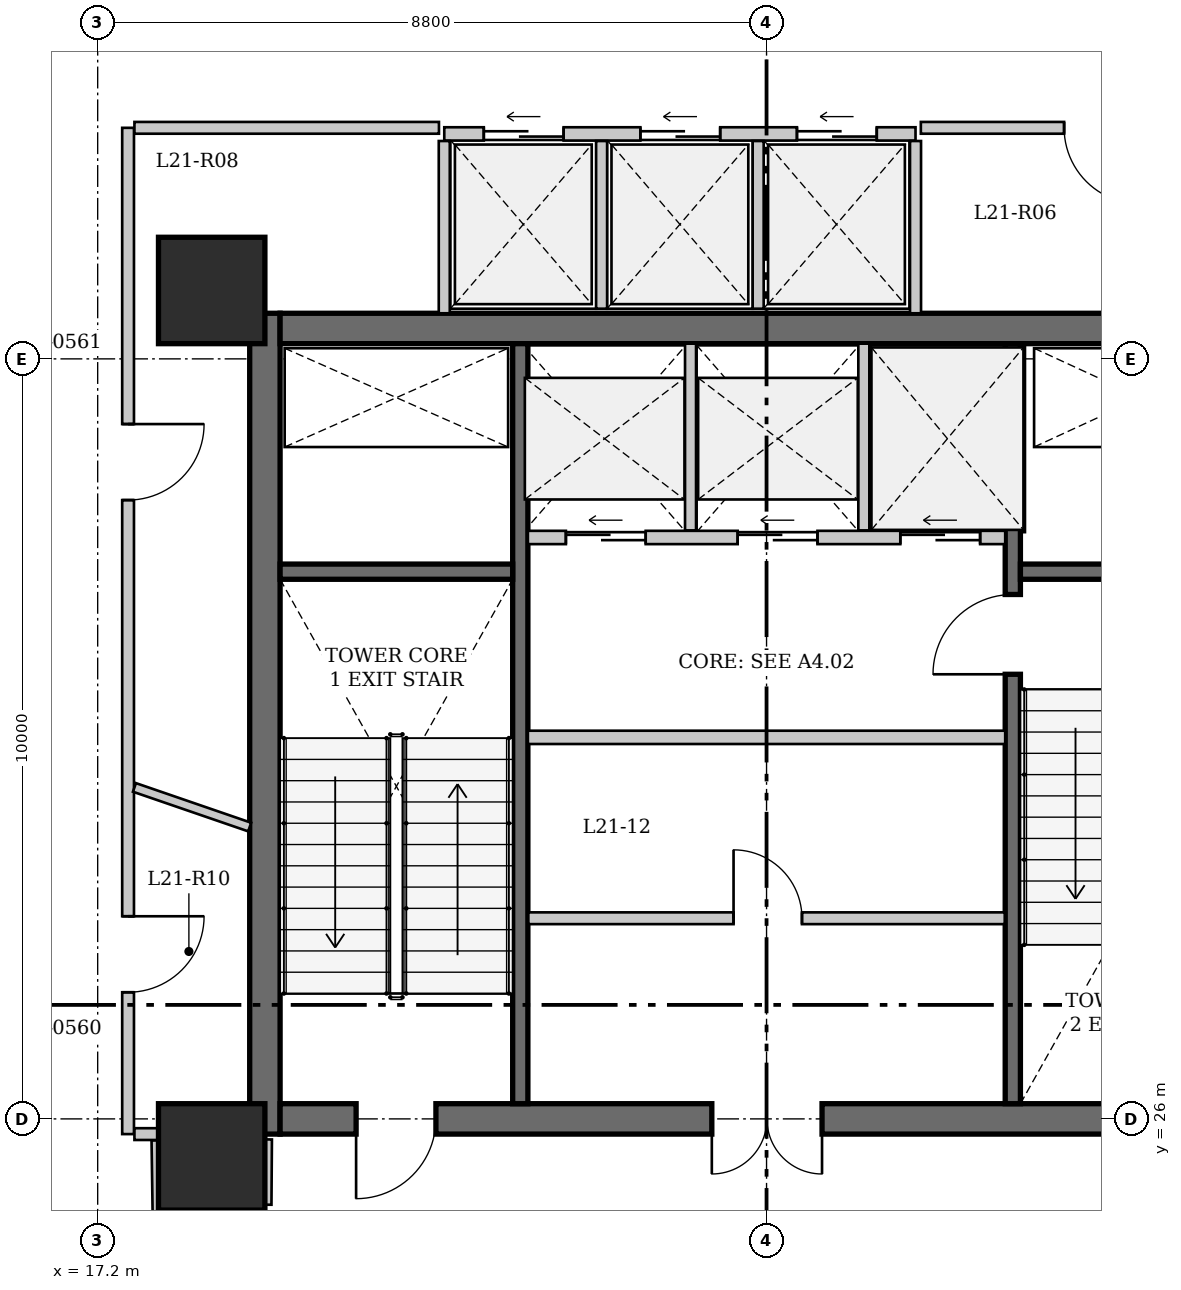
"""IFC4 building model, lengths in metres.
Left out: names, types, materials, properties, quantities, classifications, styles, units other than length and angle.
Written with IfcOpenShell. Run it as: python <this file> out.ifc"""

import sys

from ifc_helpers import new_model, si_unit, direction, frame, frame_2d, origin, origin_2d, place, context, subcontext, project, spatial, rectangle, extrude, source, transform, mapped, element, fill, save


model = new_model("IFC4")
c1 = context("Model", 3, precision=1e-05, world=origin(), true_north=direction((0.0, 1.0)))
c2 = subcontext(c1, "Body", "Model", "MODEL_VIEW")
j1 = project(units=[si_unit("LENGTHUNIT", "METRE"), si_unit("PLANEANGLEUNIT", "RADIAN")], contexts=[c1])
p1 = place(None, origin())
s1 = spatial("IfcSite", under=j1, at=p1, CompositionType="ELEMENT")
p2 = place(p1, origin())
s2 = spatial("IfcBuilding", under=s1, at=p2, CompositionType="ELEMENT")
p3 = place(p2, frame((0.0, 0.0, 84.8)))
s3 = spatial("IfcBuildingStorey", under=s2, at=p3, CompositionType="ELEMENT", Elevation=84.8)
for number, where, z_axis, x_axis in (
    (1, (18.7, 25.5, 0.0), (0.0, 0.0, 1.0), (1.0, 0.0, 0.0)),
    (2, (18.7, 36.9, 0.0), (0.0, 0.0, 1.0), (1.0, 0.0, 0.0)),
):
    element("IfcColumn", number, at=place(p3, frame(where, z_axis=z_axis, x_axis=x_axis)), inside=s3, PredefinedType="COLUMN", context=c2, shape_type="SweptSolid", body=[
        extrude(rectangle(XDim=1.4, YDim=1.4, at=origin_2d()), origin(), (0.0, 0.0, 1.0), 4.15),
    ])
p4 = place(p3, frame((19.4, 25.8, 0.0), z_axis=(0.0, 0.0, 1.0), x_axis=(0.0, 1.0, 0.0)))
e3 = element("IfcWall", 3, at=p4, inside=s3, PredefinedType="SHEAR", context=c2, shape_type="SweptSolid", body=[
    extrude(rectangle(XDim=10.8, YDim=0.4, at=frame_2d((5.4, 0.0))), origin(), (0.0, 0.0, 1.0), 4.6),
])
p5 = place(p3, frame((19.6, 36.4, 0.0), z_axis=(0.0, 0.0, 1.0), x_axis=(1.0, 0.0, 0.0)))
e4 = element("IfcWall", 4, at=p5, inside=s3, PredefinedType="SHEAR", context=c2, shape_type="SweptSolid", body=[
    extrude(rectangle(XDim=12.8, YDim=0.4, at=frame_2d((6.4, 0.0))), origin(), (0.0, 0.0, 1.0), 4.6),
])
p6 = place(p3, frame((32.4, 26.0, 0.0), z_axis=(0.0, 0.0, 1.0), x_axis=(-1.0, 0.0, 0.0)))
e5 = element("IfcWall", 5, at=p6, inside=s3, PredefinedType="SHEAR", context=c2, shape_type="SweptSolid", body=[
    extrude(rectangle(XDim=12.8, YDim=0.4, at=frame_2d((6.4, 0.0))), origin(), (0.0, 0.0, 1.0), 4.6),
])
p7 = place(p6, frame((10.75, 0.0, 0.0)))
e6 = element("IfcOpeningElement", 6, at=p7, cuts=e5, PredefinedType="OPENING", context=c2, shape_type="SweptSolid", body=[
    extrude(rectangle(XDim=1.05, YDim=2.15, at=frame_2d((0.525, 1.075))), frame((0.0, 0.21, 0.0), z_axis=(0.0, -1.0, 0.0), x_axis=(1.0, 0.0, 0.0)), (0.0, 0.0, 1.0), 0.42),
])
p8 = place(p6, frame((5.67, 0.0, 0.0)))
e7 = element("IfcOpeningElement", 7, at=p8, cuts=e5, PredefinedType="OPENING", context=c2, shape_type="SweptSolid", body=[
    extrude(rectangle(XDim=1.45, YDim=2.2, at=frame_2d((0.725, 1.1))), frame((0.0, 0.21, 0.0), z_axis=(0.0, -1.0, 0.0), x_axis=(1.0, 0.0, 0.0)), (0.0, 0.0, 1.0), 0.42),
])
p9 = place(p3, frame((22.76, 26.2, 0.0), z_axis=(0.0, 0.0, 1.0), x_axis=(0.0, 1.0, 0.0)))
e8 = element("IfcWall", 8, at=p9, inside=s3, PredefinedType="SHEAR", context=c2, shape_type="SweptSolid", body=[
    extrude(rectangle(XDim=10.0, YDim=0.2, at=frame_2d((5.0, 0.0))), origin(), (0.0, 0.0, 1.0), 4.6),
])
p10 = place(p3, frame((29.24, 26.2, 0.0), z_axis=(0.0, 0.0, 1.0), x_axis=(0.0, 1.0, 0.0)))
e9 = element("IfcWall", 9, at=p10, inside=s3, PredefinedType="SHEAR", context=c2, shape_type="SweptSolid", body=[
    extrude(rectangle(XDim=10.0, YDim=0.2, at=frame_2d((5.0, 0.0))), origin(), (0.0, 0.0, 1.0), 4.6),
])
p11 = place(p10, frame((5.65, 0.0, 0.0)))
e10 = element("IfcOpeningElement", 10, at=p11, cuts=e9, PredefinedType="OPENING", context=c2, shape_type="SweptSolid", body=[
    extrude(rectangle(XDim=1.05, YDim=2.15, at=frame_2d((0.525, 1.075))), frame((0.0, 0.11, 0.0), z_axis=(0.0, -1.0, 0.0), x_axis=(1.0, 0.0, 0.0)), (0.0, 0.0, 1.0), 0.22),
])
for number, where, z_axis, x_axis in (
    (11, (19.6, 33.2, 0.0), (0.0, 0.0, 1.0), (1.0, 0.0, 0.0)),
    (12, (29.34, 33.2, 0.0), (0.0, 0.0, 1.0), (1.0, 0.0, 0.0)),
):
    element("IfcWall", number, at=place(p3, frame(where, z_axis=z_axis, x_axis=x_axis)), inside=s3, PredefinedType="SHEAR", context=c2, shape_type="SweptSolid", body=[
        extrude(rectangle(XDim=3.06, YDim=0.2, at=frame_2d((1.53, 0.0))), origin(), (0.0, 0.0, 1.0), 4.6),
    ])
p12 = place(p3, frame((22.86, 33.65, 0.0), z_axis=(0.0, 0.0, 1.0), x_axis=(1.0, 0.0, 0.0)))
e13 = element("IfcWall", 13, at=p12, inside=s3, PredefinedType="SOLIDWALL", context=c2, shape_type="SweptSolid", body=[
    extrude(rectangle(XDim=6.28, YDim=0.175, at=frame_2d((3.14, 0.0))), origin(), (0.0, 0.0, 1.0), 4.15),
])
p13 = place(p12, frame((0.5, 0.0, 0.0)))
e14 = element("IfcOpeningElement", 14, at=p13, cuts=e13, PredefinedType="OPENING", context=c2, shape_type="SweptSolid", body=[
    extrude(rectangle(XDim=1.05, YDim=2.15, at=frame_2d((0.525, 1.075))), frame((0.0, 0.098, 0.0), z_axis=(0.0, -1.0, 0.0), x_axis=(1.0, 0.0, 0.0)), (0.0, 0.0, 1.0), 0.195),
])
p14 = place(p12, frame((2.76, 0.0, 0.0)))
e15 = element("IfcOpeningElement", 15, at=p14, cuts=e13, PredefinedType="OPENING", context=c2, shape_type="SweptSolid", body=[
    extrude(rectangle(XDim=1.05, YDim=2.15, at=frame_2d((0.525, 1.075))), frame((0.0, 0.098, 0.0), z_axis=(0.0, -1.0, 0.0), x_axis=(1.0, 0.0, 0.0)), (0.0, 0.0, 1.0), 0.195),
])
p15 = place(p12, frame((4.9, 0.0, 0.0)))
e16 = element("IfcOpeningElement", 16, at=p15, cuts=e13, PredefinedType="OPENING", context=c2, shape_type="SweptSolid", body=[
    extrude(rectangle(XDim=1.05, YDim=2.15, at=frame_2d((0.525, 1.075))), frame((0.0, 0.098, 0.0), z_axis=(0.0, -1.0, 0.0), x_axis=(1.0, 0.0, 0.0)), (0.0, 0.0, 1.0), 0.195),
])
for number, where, z_axis, x_axis in (
    (17, (25.0, 33.743, 0.0), (0.0, 0.0, 1.0), (0.0, 1.0, 0.0)),
    (18, (27.28, 33.743, 0.0), (0.0, 0.0, 1.0), (0.0, 1.0, 0.0)),
):
    element("IfcWall", number, at=place(p3, frame(where, z_axis=z_axis, x_axis=x_axis)), inside=s3, PredefinedType="SOLIDWALL", context=c2, shape_type="SweptSolid", body=[
        extrude(rectangle(XDim=2.457, YDim=0.145, at=frame_2d((1.228, 0.0))), origin(), (0.0, 0.0, 1.0), 4.15),
    ])
p16 = place(p3, frame((22.86, 31.02, 0.0), z_axis=(0.0, 0.0, 1.0), x_axis=(1.0, 0.0, 0.0)))
e19 = element("IfcWall", 19, at=p16, inside=s3, PredefinedType="SOLIDWALL", context=c2, shape_type="SweptSolid", body=[
    extrude(rectangle(XDim=6.28, YDim=0.175, at=frame_2d((3.14, 0.0))), origin(), (0.0, 0.0, 1.0), 4.15),
])
p17 = place(p3, frame((22.866, 28.64, 0.0), z_axis=(0.0, 0.0, 1.0), x_axis=(1.0, 0.0, 0.0)))
e20 = element("IfcWall", 20, at=p17, inside=s3, PredefinedType="PARTITIONING", context=c2, shape_type="SweptSolid", body=[
    extrude(rectangle(XDim=6.268, YDim=0.155, at=frame_2d((3.134, 0.0))), origin(), (0.0, 0.0, 1.0), 4.15),
])
p18 = place(p17, frame((2.7, 0.0, 0.0)))
e21 = element("IfcOpeningElement", 21, at=p18, cuts=e20, PredefinedType="OPENING", context=c2, shape_type="SweptSolid", body=[
    extrude(rectangle(XDim=0.9, YDim=2.1, at=frame_2d((0.45, 1.05))), frame((0.0, 0.087, 0.0), z_axis=(0.0, -1.0, 0.0), x_axis=(1.0, 0.0, 0.0)), (0.0, 0.0, 1.0), 0.175),
])
p19 = place(p3, frame((21.76, 38.96, 0.0), z_axis=(0.0, 0.0, 1.0), x_axis=(1.0, 0.0, 0.0)))
e22 = element("IfcWall", 22, at=p19, inside=s3, PredefinedType="SOLIDWALL", context=c2, shape_type="SweptSolid", body=[
    extrude(rectangle(XDim=6.2, YDim=0.175, at=frame_2d((3.1, 0.0))), origin(), (0.0, 0.0, 1.0), 4.15),
])
p20 = place(p19, frame((0.52, 0.0, 0.0)))
e23 = element("IfcOpeningElement", 23, at=p20, cuts=e22, PredefinedType="OPENING", context=c2, shape_type="SweptSolid", body=[
    extrude(rectangle(XDim=1.05, YDim=2.15, at=frame_2d((0.525, 1.075))), frame((0.0, 0.098, 0.0), z_axis=(0.0, -1.0, 0.0), x_axis=(1.0, 0.0, 0.0)), (0.0, 0.0, 1.0), 0.195),
])
p21 = place(p19, frame((2.58, 0.0, 0.0)))
e24 = element("IfcOpeningElement", 24, at=p21, cuts=e22, PredefinedType="OPENING", context=c2, shape_type="SweptSolid", body=[
    extrude(rectangle(XDim=1.05, YDim=2.15, at=frame_2d((0.525, 1.075))), frame((0.0, 0.098, 0.0), z_axis=(0.0, -1.0, 0.0), x_axis=(1.0, 0.0, 0.0)), (0.0, 0.0, 1.0), 0.195),
])
p22 = place(p19, frame((4.64, 0.0, 0.0)))
e25 = element("IfcOpeningElement", 25, at=p22, cuts=e22, PredefinedType="OPENING", context=c2, shape_type="SweptSolid", body=[
    extrude(rectangle(XDim=1.05, YDim=2.15, at=frame_2d((0.525, 1.075))), frame((0.0, 0.098, 0.0), z_axis=(0.0, -1.0, 0.0), x_axis=(1.0, 0.0, 0.0)), (0.0, 0.0, 1.0), 0.195),
])
for number, where, z_axis, x_axis in (
    (26, (21.76, 36.6, 0.0), (0.0, 0.0, 1.0), (0.0, 1.0, 0.0)),
    (27, (27.96, 36.6, 0.0), (0.0, 0.0, 1.0), (0.0, 1.0, 0.0)),
):
    element("IfcWall", number, at=place(p3, frame(where, z_axis=z_axis, x_axis=x_axis)), inside=s3, PredefinedType="SOLIDWALL", context=c2, shape_type="SweptSolid", body=[
        extrude(rectangle(XDim=2.266, YDim=0.145, at=frame_2d((1.133, 0.0))), origin(), (0.0, 0.0, 1.0), 4.15),
    ])
for number, where, z_axis, x_axis in (
    (28, (23.83, 36.66, 0.0), (0.0, 0.0, 1.0), (0.0, 1.0, 0.0)),
    (29, (25.89, 36.66, 0.0), (0.0, 0.0, 1.0), (0.0, 1.0, 0.0)),
):
    element("IfcWall", number, at=place(p3, frame(where, z_axis=z_axis, x_axis=x_axis)), inside=s3, PredefinedType="SOLIDWALL", context=c2, shape_type="SweptSolid", body=[
        extrude(rectangle(XDim=2.207, YDim=0.145, at=frame_2d((1.103, 0.0))), origin(), (0.0, 0.0, 1.0), 4.15),
    ])
p23 = place(p3, frame((32.8, 39.04, 0.0), z_axis=(0.0, 0.0, 1.0), x_axis=(-1.0, 0.0, 0.0)))
e30 = element("IfcWall", 30, at=p23, inside=s3, PredefinedType="PARTITIONING", context=c2, shape_type="SweptSolid", body=[
    extrude(rectangle(XDim=4.77, YDim=0.155, at=frame_2d((2.385, 0.0))), origin(), (0.0, 0.0, 1.0), 4.15),
])
p24 = place(p23, frame((1.885, 0.0, 0.0)))
e31 = element("IfcOpeningElement", 31, at=p24, cuts=e30, PredefinedType="OPENING", context=c2, shape_type="SweptSolid", body=[
    extrude(rectangle(XDim=1.0, YDim=2.15, at=frame_2d((0.5, 1.075))), frame((0.0, 0.087, 0.0), z_axis=(0.0, -1.0, 0.0), x_axis=(1.0, 0.0, 0.0)), (0.0, 0.0, 1.0), 0.175),
])
p25 = place(p3, frame((17.6, 39.04, 0.0), z_axis=(0.0, 0.0, 1.0), x_axis=(0.0, -1.0, 0.0)))
e32 = element("IfcWall", 32, at=p25, inside=s3, PredefinedType="PARTITIONING", context=c2, shape_type="SweptSolid", body=[
    extrude(rectangle(XDim=13.24, YDim=0.155, at=frame_2d((6.62, 0.0))), origin(), (0.0, 0.0, 1.0), 4.15),
])
p26 = place(p25, frame((3.898, 0.0, 0.0)))
e33 = element("IfcOpeningElement", 33, at=p26, cuts=e32, PredefinedType="OPENING", context=c2, shape_type="SweptSolid", body=[
    extrude(rectangle(XDim=1.0, YDim=2.15, at=frame_2d((0.5, 1.075))), frame((0.0, 0.087, 0.0), z_axis=(0.0, -1.0, 0.0), x_axis=(1.0, 0.0, 0.0)), (0.0, 0.0, 1.0), 0.175),
])
p27 = place(p25, frame((10.374, 0.0, 0.0)))
e34 = element("IfcOpeningElement", 34, at=p27, cuts=e32, PredefinedType="OPENING", context=c2, shape_type="SweptSolid", body=[
    extrude(rectangle(XDim=1.0, YDim=2.15, at=frame_2d((0.5, 1.075))), frame((0.0, 0.087, 0.0), z_axis=(0.0, -1.0, 0.0), x_axis=(1.0, 0.0, 0.0)), (0.0, 0.0, 1.0), 0.175),
])
p28 = place(p3, frame((21.69, 39.04, 0.0), z_axis=(0.0, 0.0, 1.0), x_axis=(-1.0, 0.0, 0.0)))
e35 = element("IfcWall", 35, at=p28, inside=s3, PredefinedType="PARTITIONING", context=c2, shape_type="SweptSolid", body=[
    extrude(rectangle(XDim=4.006, YDim=0.155, at=frame_2d((2.003, 0.0))), origin(), (0.0, 0.0, 1.0), 4.15),
])
p29 = place(p3, frame((17.684, 25.8, 0.0), z_axis=(0.0, 0.0, 1.0), x_axis=(1.0, 0.0, 0.0)))
e36 = element("IfcWall", 36, at=p29, inside=s3, PredefinedType="PARTITIONING", context=c2, shape_type="SweptSolid", body=[
    extrude(rectangle(XDim=0.302, YDim=0.155, at=frame_2d((0.151, 0.0))), origin(), (0.0, 0.0, 1.0), 2.725),
])
p30 = place(p3, frame((17.986, 25.717, 0.0), z_axis=(0.0, 0.0, 1.0), x_axis=(0.014935440835, -0.999888460083, 0.0)))
e37 = element("IfcWall", 37, at=p30, inside=s3, PredefinedType="PARTITIONING", context=c2, shape_type="SweptSolid", body=[
    extrude(rectangle(XDim=0.932, YDim=0.155, at=frame_2d((0.466, 0.0))), origin(), (0.0, 0.0, 1.0), 4.15),
])
p31 = place(p3, frame((18.083, 24.785, 0.0), z_axis=(0.0, 0.0, 1.0), x_axis=(0.99999830172, 0.001842975123, 0.0)))
e38 = element("IfcWall", 38, at=p31, inside=s3, PredefinedType="PARTITIONING", context=c2, shape_type="SweptSolid", body=[
    extrude(rectangle(XDim=1.325, YDim=0.155, at=frame_2d((0.662, 0.0))), origin(), (0.0, 0.0, 1.0), 4.15),
])
p32 = place(p3, frame((19.409, 24.871, 0.0), z_axis=(0.0, 0.0, 1.0), x_axis=(0.007106130977, 0.999974751133, 0.0)))
e39 = element("IfcWall", 39, at=p32, inside=s3, PredefinedType="PARTITIONING", context=c2, shape_type="SweptSolid", body=[
    extrude(rectangle(XDim=0.859, YDim=0.155, at=frame_2d((0.429, 0.0))), origin(), (0.0, 0.0, 1.0), 2.725),
])
p33 = place(p3, frame((19.2, 29.84, 0.0), z_axis=(0.0, 0.0, 1.0), x_axis=(-0.945688062057, 0.325075513201, 0.0)))
e40 = element("IfcWall", 40, at=p33, inside=s3, PredefinedType="PARTITIONING", context=c2, shape_type="SweptSolid", body=[
    extrude(rectangle(XDim=1.604, YDim=0.12, at=frame_2d((0.802, 0.0))), origin(), (0.0, 0.0, 1.0), 4.15),
])
m1 = source(origin(), c2, "Body", "SweptSolid", [
    extrude(rectangle(XDim=1.05, YDim=2.15, at=frame_2d((0.525, 1.075))), frame((0.0, 0.025, 0.0), z_axis=(0.0, -1.0, 0.0), x_axis=(1.0, 0.0, 0.0)), (0.0, 0.0, 1.0), 0.05),
])
p34 = place(p7, origin())
e41 = element("IfcDoor", 41, at=p34, inside=s3, OperationType="SINGLE_SWING_RIGHT", PredefinedType="DOOR", context=c2, shape_type="MappedRepresentation", body=[
    mapped(m1, transform((0.0, 0.0, 0.0), x_axis=(1.0, 0.0, 0.0), y_axis=(0.0, 1.0, 0.0), z_axis=(0.0, 0.0, 1.0), scale=1.0)),
])
fill(e6, e41)
m2 = source(origin(), c2, "Body", "SweptSolid", [
    extrude(rectangle(XDim=1.45, YDim=2.2, at=frame_2d((0.725, 1.1))), frame((0.0, 0.025, 0.0), z_axis=(0.0, -1.0, 0.0), x_axis=(1.0, 0.0, 0.0)), (0.0, 0.0, 1.0), 0.05),
])
p35 = place(p8, origin())
e42 = element("IfcDoor", 42, at=p35, inside=s3, OperationType="DOUBLE_DOOR_SINGLE_SWING", PredefinedType="DOOR", context=c2, shape_type="MappedRepresentation", body=[
    mapped(m2, transform((0.0, 0.0, 0.0), x_axis=(1.0, 0.0, 0.0), y_axis=(0.0, 1.0, 0.0), z_axis=(0.0, 0.0, 1.0), scale=1.0)),
])
fill(e7, e42)
p36 = place(p11, origin())
e43 = element("IfcDoor", 43, at=p36, inside=s3, OperationType="SINGLE_SWING_LEFT", PredefinedType="DOOR", context=c2, shape_type="MappedRepresentation", body=[
    mapped(m1, transform((0.0, 0.0, 0.0), x_axis=(1.0, 0.0, 0.0), y_axis=(0.0, 1.0, 0.0), z_axis=(0.0, 0.0, 1.0), scale=1.0)),
])
fill(e10, e43)
m3 = source(origin(), c2, "Body", "SweptSolid", [
    extrude(rectangle(XDim=1.05, YDim=2.15, at=frame_2d((0.525, 1.075))), frame((0.0, 0.025, 0.0), z_axis=(0.0, -1.0, 0.0), x_axis=(1.0, 0.0, 0.0)), (0.0, 0.0, 1.0), 0.05),
])
p37 = place(p13, origin())
e44 = element("IfcDoor", 44, at=p37, inside=s3, OperationType="SLIDING_TO_LEFT", PredefinedType="DOOR", context=c2, shape_type="MappedRepresentation", body=[
    mapped(m3, transform((0.0, 0.0, 0.0), x_axis=(1.0, 0.0, 0.0), y_axis=(0.0, 1.0, 0.0), z_axis=(0.0, 0.0, 1.0), scale=1.0)),
])
fill(e14, e44)
p38 = place(p14, origin())
e45 = element("IfcDoor", 45, at=p38, inside=s3, OperationType="SLIDING_TO_LEFT", PredefinedType="DOOR", context=c2, shape_type="MappedRepresentation", body=[
    mapped(m3, transform((0.0, 0.0, 0.0), x_axis=(1.0, 0.0, 0.0), y_axis=(0.0, 1.0, 0.0), z_axis=(0.0, 0.0, 1.0), scale=1.0)),
])
fill(e15, e45)
p39 = place(p15, origin())
e46 = element("IfcDoor", 46, at=p39, inside=s3, OperationType="SLIDING_TO_LEFT", PredefinedType="DOOR", context=c2, shape_type="MappedRepresentation", body=[
    mapped(m3, transform((0.0, 0.0, 0.0), x_axis=(1.0, 0.0, 0.0), y_axis=(0.0, 1.0, 0.0), z_axis=(0.0, 0.0, 1.0), scale=1.0)),
])
fill(e16, e46)
m4 = source(origin(), c2, "Body", "SweptSolid", [
    extrude(rectangle(XDim=0.9, YDim=2.1, at=frame_2d((0.45, 1.05))), frame((0.0, 0.025, 0.0), z_axis=(0.0, -1.0, 0.0), x_axis=(1.0, 0.0, 0.0)), (0.0, 0.0, 1.0), 0.05),
])
p40 = place(p18, origin())
e47 = element("IfcDoor", 47, at=p40, inside=s3, OperationType="SINGLE_SWING_LEFT", PredefinedType="DOOR", context=c2, shape_type="MappedRepresentation", body=[
    mapped(m4, transform((0.0, 0.0, 0.0), x_axis=(1.0, 0.0, 0.0), y_axis=(0.0, 1.0, 0.0), z_axis=(0.0, 0.0, 1.0), scale=1.0)),
])
fill(e21, e47)
p41 = place(p20, origin())
e48 = element("IfcDoor", 48, at=p41, inside=s3, OperationType="SLIDING_TO_LEFT", PredefinedType="DOOR", context=c2, shape_type="MappedRepresentation", body=[
    mapped(m3, transform((0.0, 0.0, 0.0), x_axis=(1.0, 0.0, 0.0), y_axis=(0.0, 1.0, 0.0), z_axis=(0.0, 0.0, 1.0), scale=1.0)),
])
fill(e23, e48)
p42 = place(p21, origin())
e49 = element("IfcDoor", 49, at=p42, inside=s3, OperationType="SLIDING_TO_LEFT", PredefinedType="DOOR", context=c2, shape_type="MappedRepresentation", body=[
    mapped(m3, transform((0.0, 0.0, 0.0), x_axis=(1.0, 0.0, 0.0), y_axis=(0.0, 1.0, 0.0), z_axis=(0.0, 0.0, 1.0), scale=1.0)),
])
fill(e24, e49)
p43 = place(p22, origin())
e50 = element("IfcDoor", 50, at=p43, inside=s3, OperationType="SLIDING_TO_LEFT", PredefinedType="DOOR", context=c2, shape_type="MappedRepresentation", body=[
    mapped(m3, transform((0.0, 0.0, 0.0), x_axis=(1.0, 0.0, 0.0), y_axis=(0.0, 1.0, 0.0), z_axis=(0.0, 0.0, 1.0), scale=1.0)),
])
fill(e25, e50)
m5 = source(origin(), c2, "Body", "SweptSolid", [
    extrude(rectangle(XDim=1.0, YDim=2.15, at=frame_2d((0.5, 1.075))), frame((0.0, 0.025, 0.0), z_axis=(0.0, -1.0, 0.0), x_axis=(1.0, 0.0, 0.0)), (0.0, 0.0, 1.0), 0.05),
])
p44 = place(p24, origin())
e51 = element("IfcDoor", 51, at=p44, inside=s3, OperationType="SINGLE_SWING_LEFT", PredefinedType="DOOR", context=c2, shape_type="MappedRepresentation", body=[
    mapped(m5, transform((0.0, 0.0, 0.0), x_axis=(1.0, 0.0, 0.0), y_axis=(0.0, 1.0, 0.0), z_axis=(0.0, 0.0, 1.0), scale=1.0)),
])
fill(e31, e51)
p45 = place(p26, origin())
e52 = element("IfcDoor", 52, at=p45, inside=s3, OperationType="SINGLE_SWING_LEFT", PredefinedType="DOOR", context=c2, shape_type="MappedRepresentation", body=[
    mapped(m5, transform((0.0, 0.0, 0.0), x_axis=(1.0, 0.0, 0.0), y_axis=(0.0, 1.0, 0.0), z_axis=(0.0, 0.0, 1.0), scale=1.0)),
])
fill(e33, e52)
p46 = place(p27, origin())
e53 = element("IfcDoor", 53, at=p46, inside=s3, OperationType="SINGLE_SWING_LEFT", PredefinedType="DOOR", context=c2, shape_type="MappedRepresentation", body=[
    mapped(m5, transform((0.0, 0.0, 0.0), x_axis=(1.0, 0.0, 0.0), y_axis=(0.0, 1.0, 0.0), z_axis=(0.0, 0.0, 1.0), scale=1.0)),
])
fill(e34, e53)
save(model, sys.argv[1])
